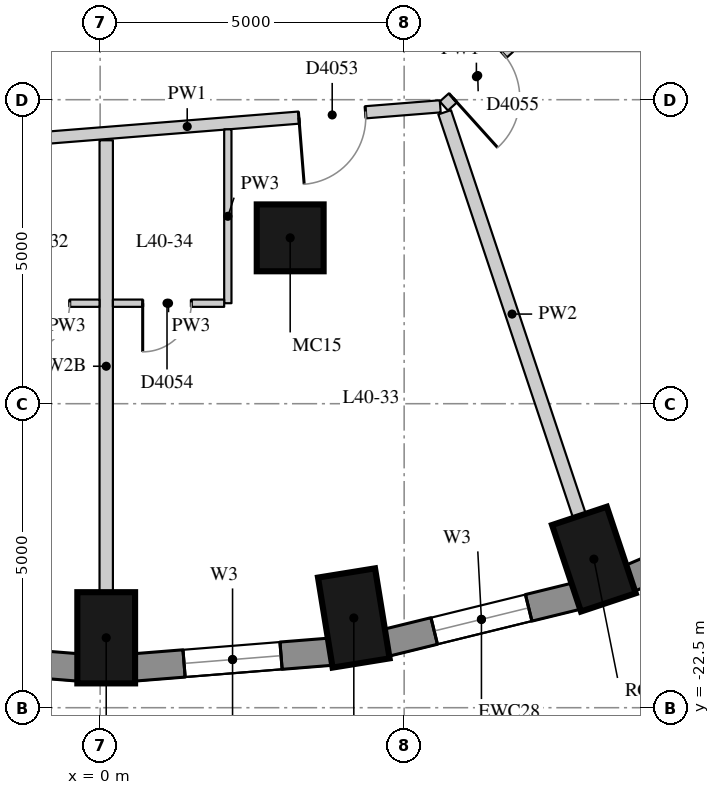
"""IFC4 building model, lengths in metres.
Left out: names, types, materials, properties, quantities, classifications, styles, units other than length and angle.
Written with IfcOpenShell. Run it as: python <this file> out.ifc"""

import sys

from ifc_helpers import new_model, si_unit, direction, frame, frame_2d, origin, origin_2d, place, context, subcontext, project, spatial, rectangle, extrude, element, fill, save


model = new_model("IFC4")
c1 = context("Model", 3, precision=1e-05, world=origin(), true_north=direction((0.0, 1.0)))
c2 = subcontext(c1, "Body", "Model", "MODEL_VIEW")
j1 = project(units=[si_unit("LENGTHUNIT", "METRE"), si_unit("PLANEANGLEUNIT", "RADIAN")], contexts=[c1])
p1 = place(None, origin())
s1 = spatial("IfcSite", under=j1, at=p1, CompositionType="ELEMENT")
p2 = place(p1, origin())
s2 = spatial("IfcBuilding", under=s1, at=p2, CompositionType="ELEMENT")
p3 = place(p2, frame((0.0, 0.0, 145.1)))
s3 = spatial("IfcBuildingStorey", under=s2, at=p3, CompositionType="ELEMENT", Elevation=145.1)
for number, where, z_axis, x_axis in (
    (1, (0.1, -21.35, 0.0), (0.0, 0.0, 1.0), (0.0, -1.0, 0.0)),
    (2, (4.172, -21.024, 0.0), (0.0, 0.0, 1.0), (0.16, -0.987, 0.0)),
    (3, (8.12, -20.056, 0.0), (0.0, 0.0, 1.0), (0.317, -0.949, 0.0)),
):
    element("IfcColumn", number, at=place(p3, frame(where, z_axis=z_axis, x_axis=x_axis)), inside=s3, PredefinedType="COLUMN", context=c2, shape_type="SweptSolid", body=[
        extrude(rectangle(XDim=1.5, YDim=0.95, at=origin_2d()), origin(), (0.0, 0.0, 1.0), 3.3),
    ])
p4 = place(p3, frame((3.126, -14.772, 0.0), z_axis=(0.0, 0.0, 1.0), x_axis=(1.0, 0.0, 0.0)))
e4 = element("IfcColumn", 4, at=p4, inside=s3, PredefinedType="COLUMN", context=c2, shape_type="SweptSolid", body=[
    extrude(rectangle(XDim=1.1, YDim=1.1, at=origin_2d()), origin(), (0.0, 0.0, 1.0), 3.3),
])
p5 = place(p3, frame((-3.601, -21.578, 0.0), z_axis=(0.0, 0.0, 1.0), x_axis=(0.996812416891, -0.079780984773, 0.0)))
e5 = element("IfcWall", 5, at=p5, inside=s3, PredefinedType="SOLIDWALL", context=c2, shape_type="SweptSolid", body=[
    extrude(rectangle(XDim=3.256, YDim=0.45, at=frame_2d((1.628, 0.0))), origin(), (0.0, 0.0, 1.0), 3.02),
])
p6 = place(p5, frame((0.828, 0.0, 0.4)))
e6 = element("IfcOpeningElement", 6, at=p6, cuts=e5, PredefinedType="OPENING", context=c2, shape_type="SweptSolid", body=[
    extrude(rectangle(XDim=1.6, YDim=1.75, at=frame_2d((0.8, 0.875))), frame((0.0, 0.235, 0.0), z_axis=(0.0, -1.0, 0.0), x_axis=(1.0, 0.0, 0.0)), (0.0, 0.0, 1.0), 0.47),
])
p7 = place(p3, frame((0.555, -21.838, 0.0), z_axis=(0.0, 0.0, 1.0), x_axis=(0.996812416891, 0.079780984773, 0.0)))
e7 = element("IfcWall", 7, at=p7, inside=s3, PredefinedType="SOLIDWALL", context=c2, shape_type="SweptSolid", body=[
    extrude(rectangle(XDim=3.256, YDim=0.45, at=frame_2d((1.628, 0.0))), origin(), (0.0, 0.0, 1.0), 3.02),
])
p8 = place(p7, frame((0.828, 0.0, 0.4)))
e8 = element("IfcOpeningElement", 8, at=p8, cuts=e7, PredefinedType="OPENING", context=c2, shape_type="SweptSolid", body=[
    extrude(rectangle(XDim=1.6, YDim=1.75, at=frame_2d((0.8, 0.875))), frame((0.0, 0.235, 0.0), z_axis=(0.0, -1.0, 0.0), x_axis=(1.0, 0.0, 0.0)), (0.0, 0.0, 1.0), 0.47),
])
p9 = place(p3, frame((4.699, -21.433, 0.0), z_axis=(0.0, 0.0, 1.0), x_axis=(0.971237178372, 0.238114139328, 0.0)))
e9 = element("IfcWall", 9, at=p9, inside=s3, PredefinedType="SOLIDWALL", context=c2, shape_type="SweptSolid", body=[
    extrude(rectangle(XDim=3.237, YDim=0.45, at=frame_2d((1.618, 0.0))), origin(), (0.0, 0.0, 1.0), 3.02),
])
p10 = place(p9, frame((0.818, 0.0, 0.4)))
e10 = element("IfcOpeningElement", 10, at=p10, cuts=e9, PredefinedType="OPENING", context=c2, shape_type="SweptSolid", body=[
    extrude(rectangle(XDim=1.6, YDim=1.75, at=frame_2d((0.8, 0.875))), frame((0.0, 0.235, 0.0), z_axis=(0.0, -1.0, 0.0), x_axis=(1.0, 0.0, 0.0)), (0.0, 0.0, 1.0), 0.47),
])
p11 = place(p3, frame((8.706, -20.375, 0.0), z_axis=(0.0, 0.0, 1.0), x_axis=(0.91981046949, 0.392362969986, 0.0)))
e11 = element("IfcWall", 11, at=p11, inside=s3, PredefinedType="SOLIDWALL", context=c2, shape_type="SweptSolid", body=[
    extrude(rectangle(XDim=3.201, YDim=0.45, at=frame_2d((1.6, 0.0))), origin(), (0.0, 0.0, 1.0), 3.02),
])
p12 = place(p11, frame((0.8, 0.0, 0.4)))
e12 = element("IfcOpeningElement", 12, at=p12, cuts=e11, PredefinedType="OPENING", context=c2, shape_type="SweptSolid", body=[
    extrude(rectangle(XDim=1.6, YDim=1.75, at=frame_2d((0.8, 0.875))), frame((0.0, 0.235, 0.0), z_axis=(0.0, -1.0, 0.0), x_axis=(1.0, 0.0, 0.0)), (0.0, 0.0, 1.0), 0.47),
])
p13 = place(p3, frame((6.723, -11.64, 0.0), z_axis=(0.0, 0.0, 1.0), x_axis=(-0.743032656565, -0.669255161562, 0.0)))
e13 = element("IfcWall", 13, at=p13, inside=s3, PredefinedType="PARTITIONING", context=c2, shape_type="SweptSolid", body=[
    extrude(rectangle(XDim=1.439, YDim=0.2, at=frame_2d((0.72, 0.0))), origin(), (0.0, 0.0, 1.0), 3.02),
])
p14 = place(p13, frame((0.14, 0.0, 0.0)))
e14 = element("IfcOpeningElement", 14, at=p14, cuts=e13, PredefinedType="OPENING", context=c2, shape_type="SweptSolid", body=[
    extrude(rectangle(XDim=1.1, YDim=2.1, at=frame_2d((0.55, 1.05))), frame((0.0, 0.11, 0.0), z_axis=(0.0, -1.0, 0.0), x_axis=(1.0, 0.0, 0.0)), (0.0, 0.0, 1.0), 0.22),
])
p15 = place(p3, frame((5.593, -12.609, 0.0), z_axis=(0.0, 0.0, 1.0), x_axis=(-0.99682930336, -0.079569717626, 0.0)))
e15 = element("IfcWall", 15, at=p15, inside=s3, PredefinedType="PARTITIONING", context=c2, shape_type="SweptSolid", body=[
    extrude(rectangle(XDim=8.349, YDim=0.2, at=frame_2d((4.174, 0.0))), origin(), (0.0, 0.0, 1.0), 3.02),
])
p16 = place(p15, frame((1.232, 0.0, 0.0)))
e16 = element("IfcOpeningElement", 16, at=p16, cuts=e15, PredefinedType="OPENING", context=c2, shape_type="SweptSolid", body=[
    extrude(rectangle(XDim=1.1, YDim=2.1, at=frame_2d((0.55, 1.05))), frame((0.0, 0.11, 0.0), z_axis=(0.0, -1.0, 0.0), x_axis=(1.0, 0.0, 0.0)), (0.0, 0.0, 1.0), 0.22),
])
p17 = place(p3, frame((0.72, -11.393, 0.0), z_axis=(0.0, 0.0, 1.0), x_axis=(-0.996836626024, -0.079477927865, 0.0)))
e17 = element("IfcWall", 17, at=p17, inside=s3, PredefinedType="PARTITIONING", context=c2, shape_type="SweptSolid", body=[
    extrude(rectangle(XDim=3.195, YDim=0.15, at=frame_2d((1.597, 0.0))), origin(), (0.0, 0.0, 1.0), 3.02),
])
p18 = place(p3, frame((0.1, -20.6, 0.0), z_axis=(0.0, 0.0, 1.0), x_axis=(0.0, 1.0, 0.0)))
e18 = element("IfcWall", 18, at=p18, inside=s3, PredefinedType="PARTITIONING", context=c2, shape_type="SweptSolid", body=[
    extrude(rectangle(XDim=7.433, YDim=0.22, at=frame_2d((3.716, 0.0))), origin(), (0.0, 0.0, 1.0), 2.57),
])
p19 = place(p3, frame((7.883, -19.345, 0.0), z_axis=(0.0, 0.0, 1.0), x_axis=(-0.31671959997, 0.948519211716, 0.0)))
e19 = element("IfcWall", 19, at=p19, inside=s3, PredefinedType="PARTITIONING", context=c2, shape_type="SweptSolid", body=[
    extrude(rectangle(XDim=6.999, YDim=0.22, at=frame_2d((3.499, 0.0))), origin(), (0.0, 0.0, 1.0), 3.02),
])
p20 = place(p3, frame((2.1, -12.988, 0.0), z_axis=(0.0, 0.0, 1.0), x_axis=(0.0, -1.0, 0.0)))
e20 = element("IfcWall", 20, at=p20, inside=s3, PredefinedType="PARTITIONING", context=c2, shape_type="SweptSolid", body=[
    extrude(rectangle(XDim=2.859, YDim=0.12, at=frame_2d((1.43, 0.0))), origin(), (0.0, 0.0, 1.0), 3.02),
])
p21 = place(p3, frame((-1.84, -15.847, 0.0), z_axis=(0.0, 0.0, 1.0), x_axis=(1.0, 0.0, 0.0)))
e21 = element("IfcWall", 21, at=p21, inside=s3, PredefinedType="PARTITIONING", context=c2, shape_type="SweptSolid", body=[
    extrude(rectangle(XDim=1.83, YDim=0.12, at=frame_2d((0.915, 0.0))), origin(), (0.0, 0.0, 1.0), 3.02),
])
p22 = place(p21, frame((0.54, 0.0, 0.0)))
e22 = element("IfcOpeningElement", 22, at=p22, cuts=e21, PredefinedType="OPENING", context=c2, shape_type="SweptSolid", body=[
    extrude(rectangle(XDim=0.8, YDim=2.1, at=frame_2d((0.4, 1.05))), frame((0.0, 0.07, 0.0), z_axis=(0.0, -1.0, 0.0), x_axis=(1.0, 0.0, 0.0)), (0.0, 0.0, 1.0), 0.14),
])
p23 = place(p3, frame((2.04, -15.847, 0.0), z_axis=(0.0, 0.0, 1.0), x_axis=(-1.0, 0.0, 0.0)))
e23 = element("IfcWall", 23, at=p23, inside=s3, PredefinedType="PARTITIONING", context=c2, shape_type="SweptSolid", body=[
    extrude(rectangle(XDim=1.83, YDim=0.12, at=frame_2d((0.915, 0.0))), origin(), (0.0, 0.0, 1.0), 3.02),
])
p24 = place(p23, frame((0.54, 0.0, 0.0)))
e24 = element("IfcOpeningElement", 24, at=p24, cuts=e23, PredefinedType="OPENING", context=c2, shape_type="SweptSolid", body=[
    extrude(rectangle(XDim=0.8, YDim=2.1, at=frame_2d((0.4, 1.05))), frame((0.0, 0.07, 0.0), z_axis=(0.0, -1.0, 0.0), x_axis=(1.0, 0.0, 0.0)), (0.0, 0.0, 1.0), 0.14),
])
p25 = place(p8, origin())
e25 = element("IfcWindow", 25, at=p25, inside=s3, PartitioningType="SINGLE_PANEL", PredefinedType="WINDOW", context=c2, shape_type="SweptSolid", body=[
    extrude(rectangle(XDim=1.6, YDim=1.75, at=frame_2d((0.8, 0.875))), frame((0.0, 0.035, 0.0), z_axis=(0.0, -1.0, 0.0), x_axis=(1.0, 0.0, 0.0)), (0.0, 0.0, 1.0), 0.06),
])
fill(e8, e25)
p26 = place(p10, origin())
e26 = element("IfcWindow", 26, at=p26, inside=s3, PartitioningType="SINGLE_PANEL", PredefinedType="WINDOW", context=c2, shape_type="SweptSolid", body=[
    extrude(rectangle(XDim=1.6, YDim=1.75, at=frame_2d((0.8, 0.875))), frame((0.0, 0.035, 0.0), z_axis=(0.0, -1.0, 0.0), x_axis=(1.0, 0.0, 0.0)), (0.0, 0.0, 1.0), 0.06),
])
fill(e10, e26)
p27 = place(p22, origin())
e27 = element("IfcDoor", 27, at=p27, inside=s3, OperationType="SINGLE_SWING_RIGHT", PredefinedType="DOOR", context=c2, shape_type="SweptSolid", body=[
    extrude(rectangle(XDim=0.8, YDim=2.1, at=frame_2d((0.4, 1.05))), frame((0.0, 0.025, 0.0), z_axis=(0.0, -1.0, 0.0), x_axis=(1.0, 0.0, 0.0)), (0.0, 0.0, 1.0), 0.05),
])
fill(e22, e27)
p28 = place(p16, origin())
e28 = element("IfcDoor", 28, at=p28, inside=s3, OperationType="SINGLE_SWING_RIGHT", PredefinedType="DOOR", context=c2, shape_type="SweptSolid", body=[
    extrude(rectangle(XDim=1.1, YDim=2.1, at=frame_2d((0.55, 1.05))), frame((0.0, 0.025, 0.0), z_axis=(0.0, -1.0, 0.0), x_axis=(1.0, 0.0, 0.0)), (0.0, 0.0, 1.0), 0.05),
])
fill(e16, e28)
p29 = place(p24, origin())
e29 = element("IfcDoor", 29, at=p29, inside=s3, OperationType="SINGLE_SWING_RIGHT", PredefinedType="DOOR", context=c2, shape_type="SweptSolid", body=[
    extrude(rectangle(XDim=0.8, YDim=2.1, at=frame_2d((0.4, 1.05))), frame((0.0, 0.025, 0.0), z_axis=(0.0, -1.0, 0.0), x_axis=(1.0, 0.0, 0.0)), (0.0, 0.0, 1.0), 0.05),
])
fill(e24, e29)
p30 = place(p14, origin())
e30 = element("IfcDoor", 30, at=p30, inside=s3, OperationType="SINGLE_SWING_RIGHT", PredefinedType="DOOR", context=c2, shape_type="SweptSolid", body=[
    extrude(rectangle(XDim=1.1, YDim=2.1, at=frame_2d((0.55, 1.05))), frame((0.0, 0.025, 0.0), z_axis=(0.0, -1.0, 0.0), x_axis=(1.0, 0.0, 0.0)), (0.0, 0.0, 1.0), 0.05),
])
fill(e14, e30)
save(model, sys.argv[1])
